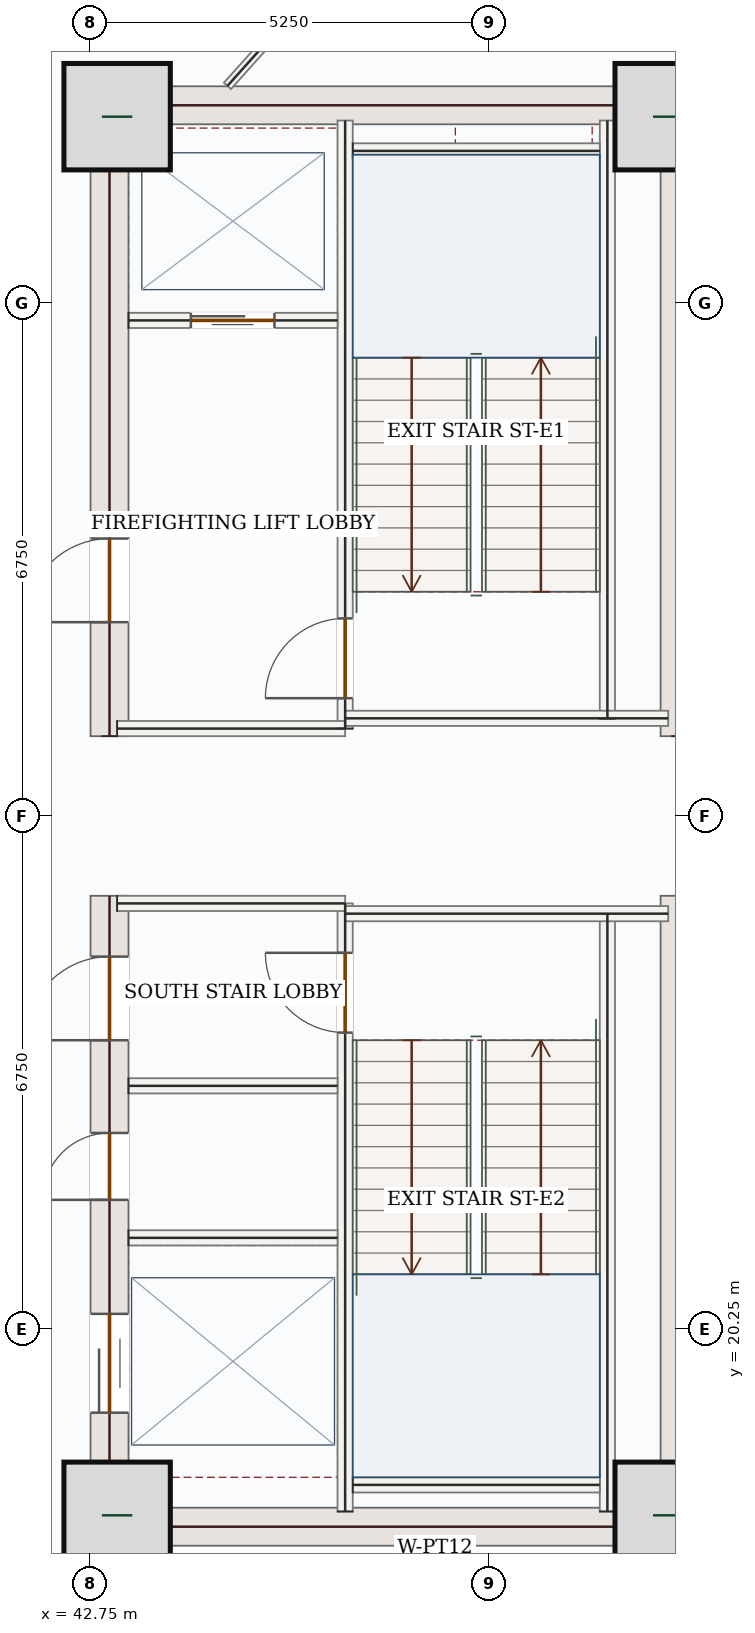
"""IFC4 building model, lengths in metres.
Left out: names, types, materials, properties, quantities, classifications, styles, units other than length and angle.
Written with IfcOpenShell. Run it as: python <this file> out.ifc"""

import sys

from ifc_helpers import new_model, si_unit, direction, frame, frame_2d, origin, origin_2d, place, context, subcontext, project, spatial, rectangle, extrude, source, transform, mapped, element, fill, save


model = new_model("IFC4")
c1 = context("Model", 3, precision=1e-05, world=origin(), true_north=direction((0.0, 1.0)))
c2 = subcontext(c1, "Body", "Model", "MODEL_VIEW")
j1 = project(units=[si_unit("LENGTHUNIT", "METRE"), si_unit("PLANEANGLEUNIT", "RADIAN")], contexts=[c1])
p1 = place(None, origin())
s1 = spatial("IfcSite", under=j1, at=p1, CompositionType="ELEMENT")
p2 = place(p1, origin())
s2 = spatial("IfcBuilding", under=s1, at=p2, CompositionType="ELEMENT")
p3 = place(p2, frame((0.0, 0.0, 66.9)))
s3 = spatial("IfcBuildingStorey", under=s2, at=p3, CompositionType="ELEMENT", Elevation=66.9)
p4 = place(p3, frame((43.0, 17.4, 0.0), z_axis=(0.0, 0.0, 1.0), x_axis=(0.0, 1.0, 0.0)))
e1 = element("IfcWall", 1, at=p4, inside=s3, PredefinedType="SHEAR", context=c2, shape_type="SweptSolid", body=[
    extrude(rectangle(XDim=8.55, YDim=0.5, at=frame_2d((4.275, 0.0))), origin(), (0.0, 0.0, 1.0), 3.95),
])
p5 = place(p4, frame((6.65, 0.0, 0.0)))
e2 = element("IfcOpeningElement", 2, at=p5, cuts=e1, PredefinedType="OPENING", context=c2, shape_type="SweptSolid", body=[
    extrude(rectangle(XDim=1.1, YDim=2.2, at=frame_2d((0.55, 1.1))), frame((0.0, 0.26, 0.0), z_axis=(0.0, -1.0, 0.0), x_axis=(1.0, 0.0, 0.0)), (0.0, 0.0, 1.0), 0.52),
])
p6 = place(p4, frame((1.75, 0.0, 0.0)))
e3 = element("IfcOpeningElement", 3, at=p6, cuts=e1, PredefinedType="OPENING", context=c2, shape_type="SweptSolid", body=[
    extrude(rectangle(XDim=1.3, YDim=2.2, at=frame_2d((0.65, 1.1))), frame((0.0, 0.26, 0.0), z_axis=(0.0, -1.0, 0.0), x_axis=(1.0, 0.0, 0.0)), (0.0, 0.0, 1.0), 0.52),
])
p7 = place(p4, frame((4.55, 0.0, 0.0)))
e4 = element("IfcOpeningElement", 4, at=p7, cuts=e1, PredefinedType="OPENING", context=c2, shape_type="SweptSolid", body=[
    extrude(rectangle(XDim=0.88, YDim=2.1, at=frame_2d((0.44, 1.05))), frame((0.0, 0.26, 0.0), z_axis=(0.0, -1.0, 0.0), x_axis=(1.0, 0.0, 0.0)), (0.0, 0.0, 1.0), 0.52),
])
p8 = place(p3, frame((43.0, 28.05, 0.0), z_axis=(0.0, 0.0, 1.0), x_axis=(0.0, 1.0, 0.0)))
e5 = element("IfcWall", 5, at=p8, inside=s3, PredefinedType="SHEAR", context=c2, shape_type="SweptSolid", body=[
    extrude(rectangle(XDim=8.55, YDim=0.5, at=frame_2d((4.275, 0.0))), origin(), (0.0, 0.0, 1.0), 3.95),
])
p9 = place(p8, frame((1.5, 0.0, 0.0)))
e6 = element("IfcOpeningElement", 6, at=p9, cuts=e5, PredefinedType="OPENING", context=c2, shape_type="SweptSolid", body=[
    extrude(rectangle(XDim=1.1, YDim=2.2, at=frame_2d((0.55, 1.1))), frame((0.0, 0.26, 0.0), z_axis=(0.0, -1.0, 0.0), x_axis=(1.0, 0.0, 0.0)), (0.0, 0.0, 1.0), 0.52),
])
m1 = source(origin(), c2, "Body", "SweptSolid", [
    extrude(rectangle(XDim=8.55, YDim=0.5, at=frame_2d((4.275, 0.0))), origin(), (0.0, 0.0, 1.0), 3.95),
])
for number, where, z_axis, x_axis in (
    (7, (50.5, 17.4, 0.0), (0.0, 0.0, 1.0), (0.0, 1.0, 0.0)),
    (8, (50.5, 28.05, 0.0), (0.0, 0.0, 1.0), (0.0, 1.0, 0.0)),
):
    element("IfcWall", number, at=place(p3, frame(where, z_axis=z_axis, x_axis=x_axis)), inside=s3, PredefinedType="SHEAR", context=c2, shape_type="MappedRepresentation", body=[
        mapped(m1, transform((0.0, 0.0, 0.0), x_axis=(1.0, 0.0, 0.0), y_axis=(0.0, 1.0, 0.0), z_axis=(0.0, 0.0, 1.0), scale=1.0)),
    ])
m2 = source(origin(), c2, "Body", "SweptSolid", [
    extrude(rectangle(XDim=7.0, YDim=0.5, at=frame_2d((3.5, 0.0))), origin(), (0.0, 0.0, 1.0), 3.95),
])
for number, where, z_axis, x_axis in (
    (9, (43.25, 17.65, 0.0), (0.0, 0.0, 1.0), (1.0, 0.0, 0.0)),
    (10, (43.25, 36.35, 0.0), (0.0, 0.0, 1.0), (1.0, 0.0, 0.0)),
):
    element("IfcWall", number, at=place(p3, frame(where, z_axis=z_axis, x_axis=x_axis)), inside=s3, PredefinedType="SHEAR", context=c2, shape_type="MappedRepresentation", body=[
        mapped(m2, transform((0.0, 0.0, 0.0), x_axis=(1.0, 0.0, 0.0), y_axis=(0.0, 1.0, 0.0), z_axis=(0.0, 0.0, 1.0), scale=1.0)),
    ])
m3 = source(origin(), c2, "Body", "SweptSolid", [
    extrude(rectangle(XDim=1.4, YDim=1.4, at=origin_2d()), origin(), (0.0, 0.0, 1.0), 4.2),
])
for number, where, z_axis, x_axis in (
    (11, (43.1, 17.8, 0.0), (0.0, 0.0, 1.0), (1.0, 0.0, 0.0)),
    (12, (50.35, 17.8, 0.0), (0.0, 0.0, 1.0), (1.0, 0.0, 0.0)),
    (13, (43.1, 36.2, 0.0), (0.0, 0.0, 1.0), (1.0, 0.0, 0.0)),
    (14, (50.35, 36.2, 0.0), (0.0, 0.0, 1.0), (1.0, 0.0, 0.0)),
):
    element("IfcColumn", number, at=place(p3, frame(where, z_axis=z_axis, x_axis=x_axis)), inside=s3, PredefinedType="COLUMN", context=c2, shape_type="MappedRepresentation", body=[
        mapped(m3, transform((0.0, 0.0, 0.0), x_axis=(1.0, 0.0, 0.0), y_axis=(0.0, 1.0, 0.0), z_axis=(0.0, 0.0, 1.0), scale=1.0)),
    ])
p10 = place(p3, frame((53.06, 18.458, 0.0), z_axis=(0.0, 0.0, 1.0), x_axis=(-0.707106781187, -0.707106781187, 0.0)))
e15 = element("IfcWall", 15, at=p10, inside=s3, PredefinedType="SOLIDWALL", context=c2, shape_type="SweptSolid", body=[
    extrude(rectangle(XDim=5.258, YDim=0.32, at=frame_2d((2.629, 0.0))), origin(), (0.0, 0.0, 1.0), 3.95),
])
p11 = place(p10, frame((1.429, 0.0, 0.85)))
e16 = element("IfcOpeningElement", 16, at=p11, cuts=e15, PredefinedType="OPENING", context=c2, shape_type="SweptSolid", body=[
    extrude(rectangle(XDim=2.4, YDim=1.8, at=frame_2d((1.2, 0.9))), frame((0.0, 0.17, 0.0), z_axis=(0.0, -1.0, 0.0), x_axis=(1.0, 0.0, 0.0)), (0.0, 0.0, 1.0), 0.34),
])
m4 = source(origin(), c2, "Body", "SweptSolid", [
    extrude(rectangle(XDim=5.258, YDim=0.32, at=frame_2d((2.629, 0.0))), origin(), (0.0, 0.0, 1.0), 3.95),
])
p12 = place(p3, frame((49.342, 39.26, 0.0), z_axis=(0.0, 0.0, 1.0), x_axis=(0.707106781187, -0.707106781187, 0.0)))
e17 = element("IfcWall", 17, at=p12, inside=s3, PredefinedType="SOLIDWALL", context=c2, shape_type="MappedRepresentation", body=[
    mapped(m4, transform((0.0, 0.0, 0.0), x_axis=(1.0, 0.0, 0.0), y_axis=(0.0, 1.0, 0.0), z_axis=(0.0, 0.0, 1.0), scale=1.0)),
])
m5 = source(origin(), c2, "Body", "SweptSolid", [
    extrude(rectangle(XDim=7.87, YDim=0.2, at=frame_2d((3.935, 0.0))), origin(), (0.0, 0.0, 1.0), 3.95),
])
for number, where, z_axis, x_axis in (
    (18, (49.55, 17.85, 0.0), (0.0, 0.0, 1.0), (0.0, 1.0, 0.0)),
    (19, (49.55, 28.28, 0.0), (0.0, 0.0, 1.0), (0.0, 1.0, 0.0)),
):
    element("IfcWall", number, at=place(p3, frame(where, z_axis=z_axis, x_axis=x_axis)), inside=s3, PredefinedType="SOLIDWALL", context=c2, shape_type="MappedRepresentation", body=[
        mapped(m5, transform((0.0, 0.0, 0.0), x_axis=(1.0, 0.0, 0.0), y_axis=(0.0, 1.0, 0.0), z_axis=(0.0, 0.0, 1.0), scale=1.0)),
    ])
p13 = place(p3, frame((46.1, 17.85, 0.0), z_axis=(0.0, 0.0, 1.0), x_axis=(0.0, 1.0, 0.0)))
e20 = element("IfcWall", 20, at=p13, inside=s3, PredefinedType="SOLIDWALL", context=c2, shape_type="SweptSolid", body=[
    extrude(rectangle(XDim=8.0, YDim=0.2, at=frame_2d((4.0, 0.0))), origin(), (0.0, 0.0, 1.0), 3.95),
])
p14 = place(p13, frame((6.3, 0.0, 0.0)))
e21 = element("IfcOpeningElement", 21, at=p14, cuts=e20, PredefinedType="OPENING", context=c2, shape_type="SweptSolid", body=[
    extrude(rectangle(XDim=1.05, YDim=2.15, at=frame_2d((0.525, 1.075))), frame((0.0, 0.11, 0.0), z_axis=(0.0, -1.0, 0.0), x_axis=(1.0, 0.0, 0.0)), (0.0, 0.0, 1.0), 0.22),
])
p15 = place(p3, frame((46.1, 28.15, 0.0), z_axis=(0.0, 0.0, 1.0), x_axis=(0.0, 1.0, 0.0)))
e22 = element("IfcWall", 22, at=p15, inside=s3, PredefinedType="SOLIDWALL", context=c2, shape_type="SweptSolid", body=[
    extrude(rectangle(XDim=8.0, YDim=0.2, at=frame_2d((4.0, 0.0))), origin(), (0.0, 0.0, 1.0), 3.95),
])
p16 = place(p15, frame((0.4, 0.0, 0.0)))
e23 = element("IfcOpeningElement", 23, at=p16, cuts=e22, PredefinedType="OPENING", context=c2, shape_type="SweptSolid", body=[
    extrude(rectangle(XDim=1.05, YDim=2.15, at=frame_2d((0.525, 1.075))), frame((0.0, 0.11, 0.0), z_axis=(0.0, -1.0, 0.0), x_axis=(1.0, 0.0, 0.0)), (0.0, 0.0, 1.0), 0.22),
])
m6 = source(origin(), c2, "Body", "SweptSolid", [
    extrude(rectangle(XDim=3.0, YDim=0.2, at=frame_2d((1.5, 0.0))), origin(), (0.0, 0.0, 1.0), 3.95),
])
p17 = place(p3, frame((43.1, 25.85, 0.0), z_axis=(0.0, 0.0, 1.0), x_axis=(1.0, 0.0, 0.0)))
e24 = element("IfcWall", 24, at=p17, inside=s3, PredefinedType="SOLIDWALL", context=c2, shape_type="MappedRepresentation", body=[
    mapped(m6, transform((0.0, 0.0, 0.0), x_axis=(1.0, 0.0, 0.0), y_axis=(0.0, 1.0, 0.0), z_axis=(0.0, 0.0, 1.0), scale=1.0)),
])
m7 = source(origin(), c2, "Body", "SweptSolid", [
    extrude(rectangle(XDim=4.25, YDim=0.2, at=frame_2d((2.125, 0.0))), origin(), (0.0, 0.0, 1.0), 3.95),
])
p18 = place(p3, frame((46.1, 25.715, 0.0), z_axis=(0.0, 0.0, 1.0), x_axis=(1.0, 0.0, 0.0)))
e25 = element("IfcWall", 25, at=p18, inside=s3, PredefinedType="SOLIDWALL", context=c2, shape_type="MappedRepresentation", body=[
    mapped(m7, transform((0.0, 0.0, 0.0), x_axis=(1.0, 0.0, 0.0), y_axis=(0.0, 1.0, 0.0), z_axis=(0.0, 0.0, 1.0), scale=1.0)),
])
p19 = place(p3, frame((43.1, 28.15, 0.0), z_axis=(0.0, 0.0, 1.0), x_axis=(1.0, 0.0, 0.0)))
e26 = element("IfcWall", 26, at=p19, inside=s3, PredefinedType="SOLIDWALL", context=c2, shape_type="MappedRepresentation", body=[
    mapped(m6, transform((0.0, 0.0, 0.0), x_axis=(1.0, 0.0, 0.0), y_axis=(0.0, 1.0, 0.0), z_axis=(0.0, 0.0, 1.0), scale=1.0)),
])
p20 = place(p3, frame((46.1, 28.285, 0.0), z_axis=(0.0, 0.0, 1.0), x_axis=(1.0, 0.0, 0.0)))
e27 = element("IfcWall", 27, at=p20, inside=s3, PredefinedType="SOLIDWALL", context=c2, shape_type="MappedRepresentation", body=[
    mapped(m7, transform((0.0, 0.0, 0.0), x_axis=(1.0, 0.0, 0.0), y_axis=(0.0, 1.0, 0.0), z_axis=(0.0, 0.0, 1.0), scale=1.0)),
])
m8 = source(origin(), c2, "Body", "SweptSolid", [
    extrude(rectangle(XDim=3.25, YDim=0.2, at=frame_2d((1.625, 0.0))), origin(), (0.0, 0.0, 1.0), 3.95),
])
for number, where, z_axis, x_axis in (
    (28, (46.2, 35.75, 0.0), (0.0, 0.0, 1.0), (1.0, 0.0, 0.0)),
    (29, (46.2, 18.2, 0.0), (0.0, 0.0, 1.0), (1.0, 0.0, 0.0)),
):
    element("IfcWall", number, at=place(p3, frame(where, z_axis=z_axis, x_axis=x_axis)), inside=s3, PredefinedType="SOLIDWALL", context=c2, shape_type="MappedRepresentation", body=[
        mapped(m8, transform((0.0, 0.0, 0.0), x_axis=(1.0, 0.0, 0.0), y_axis=(0.0, 1.0, 0.0), z_axis=(0.0, 0.0, 1.0), scale=1.0)),
    ])
p21 = place(p3, frame((43.25, 33.52, 0.0), z_axis=(0.0, 0.0, 1.0), x_axis=(1.0, 0.0, 0.0)))
e30 = element("IfcWall", 30, at=p21, inside=s3, PredefinedType="SOLIDWALL", context=c2, shape_type="SweptSolid", body=[
    extrude(rectangle(XDim=2.75, YDim=0.2, at=frame_2d((1.375, 0.0))), origin(), (0.0, 0.0, 1.0), 3.95),
])
p22 = place(p21, frame((0.82, 0.0, 0.0)))
e31 = element("IfcOpeningElement", 31, at=p22, cuts=e30, PredefinedType="OPENING", context=c2, shape_type="SweptSolid", body=[
    extrude(rectangle(XDim=1.1, YDim=2.15, at=frame_2d((0.55, 1.075))), frame((0.0, 0.11, 0.0), z_axis=(0.0, -1.0, 0.0), x_axis=(1.0, 0.0, 0.0)), (0.0, 0.0, 1.0), 0.22),
])
m9 = source(origin(), c2, "Body", "SweptSolid", [
    extrude(rectangle(XDim=2.75, YDim=0.2, at=frame_2d((1.375, 0.0))), origin(), (0.0, 0.0, 1.0), 3.95),
])
for number, where, z_axis, x_axis in (
    (32, (43.25, 23.45, 0.0), (0.0, 0.0, 1.0), (1.0, 0.0, 0.0)),
    (33, (43.25, 21.45, 0.0), (0.0, 0.0, 1.0), (1.0, 0.0, 0.0)),
):
    element("IfcWall", number, at=place(p3, frame(where, z_axis=z_axis, x_axis=x_axis)), inside=s3, PredefinedType="SOLIDWALL", context=c2, shape_type="MappedRepresentation", body=[
        mapped(m9, transform((0.0, 0.0, 0.0), x_axis=(1.0, 0.0, 0.0), y_axis=(0.0, 1.0, 0.0), z_axis=(0.0, 0.0, 1.0), scale=1.0)),
    ])
m10 = source(origin(), c2, "Body", "SweptSolid", [
    extrude(rectangle(XDim=1.099, YDim=0.125, at=frame_2d((0.549, 0.0))), origin(), (0.0, 0.0, 1.0), 3.95),
])
p23 = place(p3, frame((46.871, 17.395, 0.0), z_axis=(0.0, 0.0, 1.0), x_axis=(0.750977912422, -0.660327324177, 0.0)))
e34 = element("IfcWall", 34, at=p23, inside=s3, PredefinedType="PARTITIONING", context=c2, shape_type="MappedRepresentation", body=[
    mapped(m10, transform((0.0, 0.0, 0.0), x_axis=(1.0, 0.0, 0.0), y_axis=(0.0, 1.0, 0.0), z_axis=(0.0, 0.0, 1.0), scale=1.0)),
])
m11 = source(origin(), c2, "Body", "SweptSolid", [
    extrude(rectangle(XDim=3.348, YDim=0.125, at=frame_2d((1.674, 0.0))), origin(), (0.0, 0.0, 1.0), 3.95),
])
p24 = place(p3, frame((46.785, 39.099, 0.0), z_axis=(0.0, 0.0, 1.0), x_axis=(-0.667206176518, -0.74487308853, 0.0)))
e35 = element("IfcWall", 35, at=p24, inside=s3, PredefinedType="PARTITIONING", context=c2, shape_type="MappedRepresentation", body=[
    mapped(m11, transform((0.0, 0.0, 0.0), x_axis=(1.0, 0.0, 0.0), y_axis=(0.0, 1.0, 0.0), z_axis=(0.0, 0.0, 1.0), scale=1.0)),
])
m12 = source(origin(), c2, "Body", "SweptSolid", [
    extrude(rectangle(XDim=2.4, YDim=1.8, at=frame_2d((1.2, 0.9))), frame((0.0, 0.03, 0.0), z_axis=(0.0, -1.0, 0.0), x_axis=(1.0, 0.0, 0.0)), (0.0, 0.0, 1.0), 0.06),
])
p25 = place(p11, origin())
e36 = element("IfcWindow", 36, at=p25, inside=s3, PartitioningType="DOUBLE_PANEL_VERTICAL", PredefinedType="WINDOW", context=c2, shape_type="MappedRepresentation", body=[
    mapped(m12, transform((0.0, 0.0, 0.0), x_axis=(1.0, 0.0, 0.0), y_axis=(0.0, 1.0, 0.0), z_axis=(0.0, 0.0, 1.0), scale=1.0)),
])
fill(e16, e36)
m13 = source(origin(), c2, "Body", "SweptSolid", [
    extrude(rectangle(XDim=1.05, YDim=2.15, at=frame_2d((0.525, 1.075))), frame((0.0, 0.025, 0.0), z_axis=(0.0, -1.0, 0.0), x_axis=(1.0, 0.0, 0.0)), (0.0, 0.0, 1.0), 0.05),
])
p26 = place(p16, origin())
e37 = element("IfcDoor", 37, at=p26, inside=s3, OperationType="SINGLE_SWING_LEFT", PredefinedType="DOOR", context=c2, shape_type="MappedRepresentation", body=[
    mapped(m13, transform((0.0, 0.0, 0.0), x_axis=(1.0, 0.0, 0.0), y_axis=(0.0, 1.0, 0.0), z_axis=(0.0, 0.0, 1.0), scale=1.0)),
])
fill(e23, e37)
p27 = place(p14, origin())
e38 = element("IfcDoor", 38, at=p27, inside=s3, OperationType="SINGLE_SWING_RIGHT", PredefinedType="DOOR", context=c2, shape_type="MappedRepresentation", body=[
    mapped(m13, transform((0.0, 0.0, 0.0), x_axis=(1.0, 0.0, 0.0), y_axis=(0.0, 1.0, 0.0), z_axis=(0.0, 0.0, 1.0), scale=1.0)),
])
fill(e21, e38)
m14 = source(origin(), c2, "Body", "SweptSolid", [
    extrude(rectangle(XDim=1.1, YDim=2.15, at=frame_2d((0.55, 1.075))), frame((0.0, 0.025, 0.0), z_axis=(0.0, -1.0, 0.0), x_axis=(1.0, 0.0, 0.0)), (0.0, 0.0, 1.0), 0.05),
])
p28 = place(p22, origin())
e39 = element("IfcDoor", 39, at=p28, inside=s3, OperationType="DOUBLE_DOOR_SLIDING", PredefinedType="DOOR", context=c2, shape_type="MappedRepresentation", body=[
    mapped(m14, transform((0.0, 0.0, 0.0), x_axis=(1.0, 0.0, 0.0), y_axis=(0.0, 1.0, 0.0), z_axis=(0.0, 0.0, 1.0), scale=1.0)),
])
fill(e31, e39)
m15 = source(origin(), c2, "Body", "SweptSolid", [
    extrude(rectangle(XDim=1.1, YDim=2.2, at=frame_2d((0.55, 1.1))), frame((0.0, 0.025, 0.0), z_axis=(0.0, -1.0, 0.0), x_axis=(1.0, 0.0, 0.0)), (0.0, 0.0, 1.0), 0.05),
])
p29 = place(p9, origin())
e40 = element("IfcDoor", 40, at=p29, inside=s3, OperationType="SINGLE_SWING_LEFT", PredefinedType="DOOR", context=c2, shape_type="MappedRepresentation", body=[
    mapped(m15, transform((0.0, 0.0, 0.0), x_axis=(1.0, 0.0, 0.0), y_axis=(0.0, 1.0, 0.0), z_axis=(0.0, 0.0, 1.0), scale=1.0)),
])
fill(e6, e40)
p30 = place(p5, origin())
e41 = element("IfcDoor", 41, at=p30, inside=s3, OperationType="SINGLE_SWING_LEFT", PredefinedType="DOOR", context=c2, shape_type="MappedRepresentation", body=[
    mapped(m15, transform((0.0, 0.0, 0.0), x_axis=(1.0, 0.0, 0.0), y_axis=(0.0, 1.0, 0.0), z_axis=(0.0, 0.0, 1.0), scale=1.0)),
])
fill(e2, e41)
m16 = source(origin(), c2, "Body", "SweptSolid", [
    extrude(rectangle(XDim=1.3, YDim=2.2, at=frame_2d((0.65, 1.1))), frame((0.0, 0.025, 0.0), z_axis=(0.0, -1.0, 0.0), x_axis=(1.0, 0.0, 0.0)), (0.0, 0.0, 1.0), 0.05),
])
p31 = place(p6, origin())
e42 = element("IfcDoor", 42, at=p31, inside=s3, OperationType="DOUBLE_DOOR_SLIDING", PredefinedType="DOOR", context=c2, shape_type="MappedRepresentation", body=[
    mapped(m16, transform((0.0, 0.0, 0.0), x_axis=(1.0, 0.0, 0.0), y_axis=(0.0, 1.0, 0.0), z_axis=(0.0, 0.0, 1.0), scale=1.0)),
])
fill(e3, e42)
m17 = source(origin(), c2, "Body", "SweptSolid", [
    extrude(rectangle(XDim=0.88, YDim=2.1, at=frame_2d((0.44, 1.05))), frame((0.0, 0.025, 0.0), z_axis=(0.0, -1.0, 0.0), x_axis=(1.0, 0.0, 0.0)), (0.0, 0.0, 1.0), 0.05),
])
p32 = place(p7, origin())
e43 = element("IfcDoor", 43, at=p32, inside=s3, OperationType="SINGLE_SWING_LEFT", PredefinedType="DOOR", context=c2, shape_type="MappedRepresentation", body=[
    mapped(m17, transform((0.0, 0.0, 0.0), x_axis=(1.0, 0.0, 0.0), y_axis=(0.0, 1.0, 0.0), z_axis=(0.0, 0.0, 1.0), scale=1.0)),
])
fill(e4, e43)
save(model, sys.argv[1])
